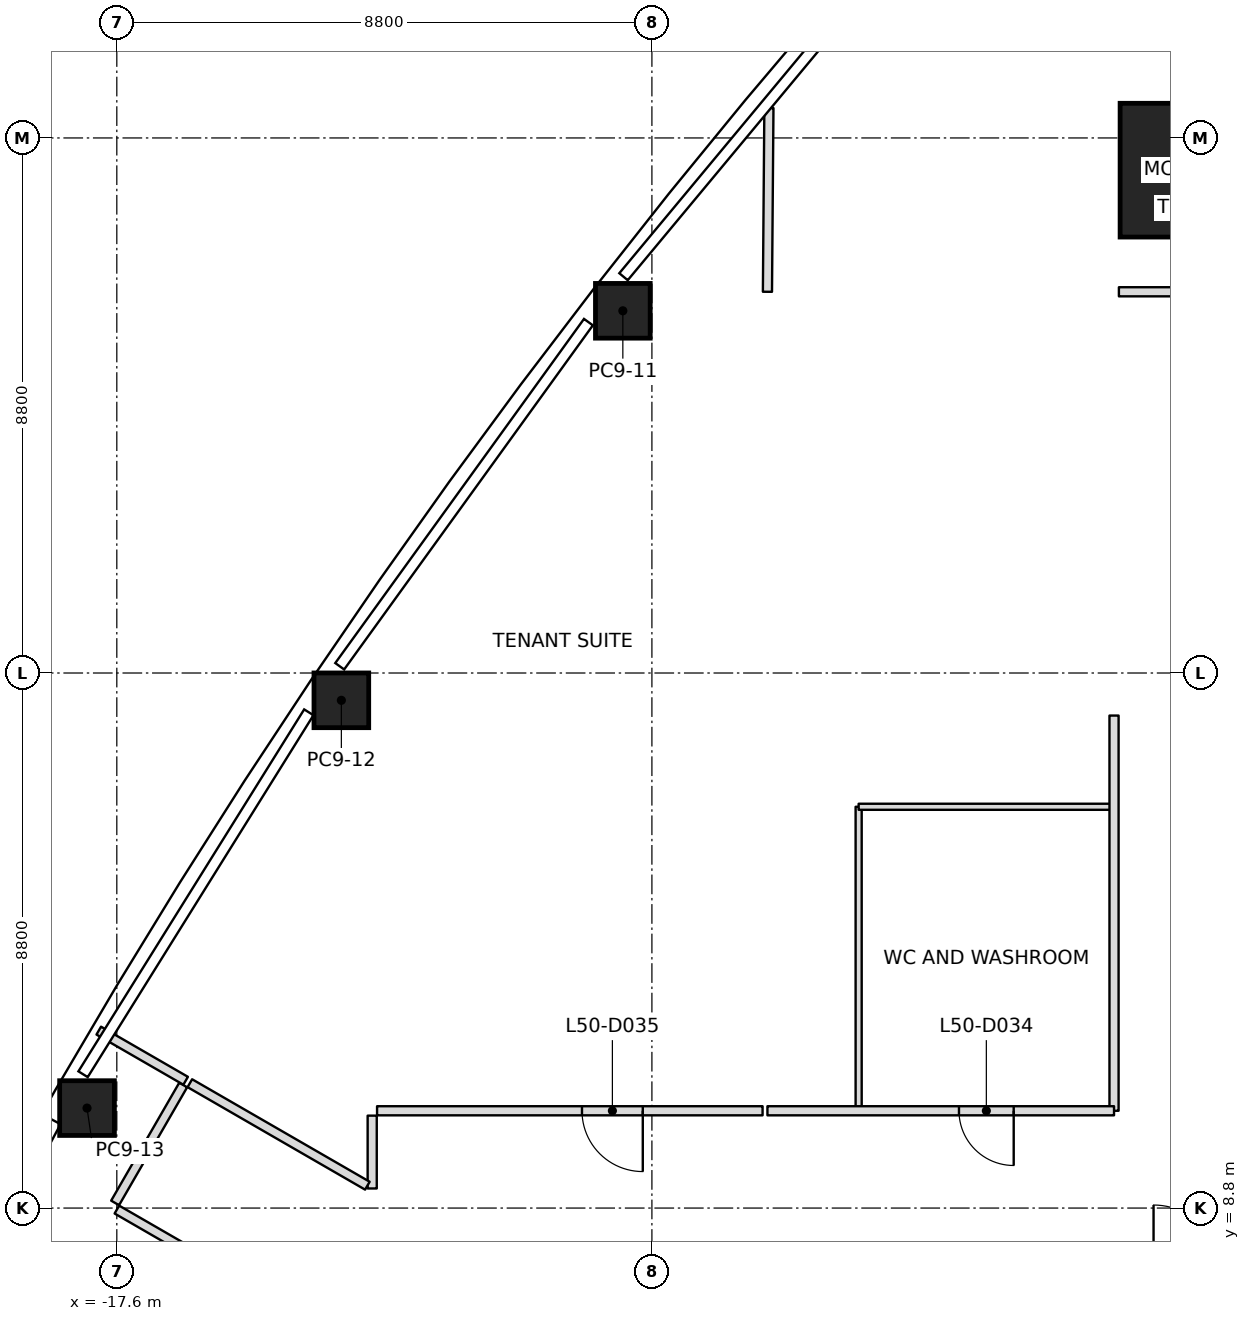
"""IFC4 building model, lengths in metres.
Left out: names, types, materials, properties, quantities, classifications, styles, units other than length and angle.
Written with IfcOpenShell. Run it as: python <this file> out.ifc"""

import sys

from ifc_helpers import new_model, si_unit, direction, frame, frame_2d, origin, origin_2d, place, context, subcontext, project, spatial, rectangle, extrude, clip, halfspace, element, fill, save


model = new_model("IFC4")
c1 = context("Model", 3, precision=1e-05, world=origin(), true_north=direction((0.0, 1.0)))
c2 = subcontext(c1, "Body", "Model", "MODEL_VIEW")
j1 = project(units=[si_unit("LENGTHUNIT", "METRE"), si_unit("PLANEANGLEUNIT", "RADIAN")], contexts=[c1])
p1 = place(None, origin())
s1 = spatial("IfcSite", under=j1, at=p1, CompositionType="ELEMENT")
p2 = place(p1, origin())
s2 = spatial("IfcBuilding", under=s1, at=p2, CompositionType="ELEMENT")
p3 = place(p2, frame((0.0, 0.0, 227.0)))
s3 = spatial("IfcBuildingStorey", under=s2, at=p3, CompositionType="ELEMENT", Elevation=227.0)
p4 = place(p3, frame((0.0, 25.87, 0.0), z_axis=(0.0, -0.032209841054, 0.999481128456), x_axis=(1.0, 0.0, 0.0)))
e1 = element("IfcColumn", 1, at=p4, inside=s3, PredefinedType="COLUMN", context=c2, shape_type="SweptSolid", body=[
    clip(extrude(rectangle(XDim=2.2, YDim=2.2, at=origin_2d()), origin(), (0.0, 0.0, 1.0), 4.002), halfspace(frame((0.0, 0.0, 0.008)), True)),
])
p5 = place(p3, frame((-9.278, 23.557, 0.0), z_axis=(0.000244089904, -0.020381506962, 0.999792245716), x_axis=(0.612951165018, 0.789959701895, 0.015954268541)))
e2 = element("IfcColumn", 2, at=p5, inside=s3, PredefinedType="COLUMN", context=c2, shape_type="SweptSolid", body=[
    clip(extrude(rectangle(XDim=0.9, YDim=0.9, at=origin_2d()), origin(), (0.0, 0.0, 1.0), 4.001), halfspace(frame((0.0, 0.0, 0.003)), True)),
])
p6 = place(p3, frame((-13.907, 17.151, 0.0), z_axis=(0.005248490815, -0.013243284963, 0.999898529226), x_axis=(0.557760604699, 0.829962689553, 0.008064849343)))
e3 = element("IfcColumn", 3, at=p6, inside=s3, PredefinedType="COLUMN", context=c2, shape_type="SweptSolid", body=[
    clip(extrude(rectangle(XDim=0.9, YDim=0.9, at=origin_2d()), origin(), (0.0, 0.0, 1.0), 4.0), halfspace(frame((0.0, 0.0, 0.002)), True)),
])
p7 = place(p3, frame((-18.09, 10.444, 0.0), z_axis=(0.009948074445, -0.005736926367, 0.999934059571), x_axis=(0.499975258342, 0.8660396879, -5.385525e-06)))
e4 = element("IfcColumn", 4, at=p7, inside=s3, PredefinedType="COLUMN", context=c2, shape_type="SweptSolid", body=[
    clip(extrude(rectangle(XDim=0.9, YDim=0.9, at=origin_2d()), origin(), (0.0, 0.0, 1.0), 4.0), halfspace(frame((0.0, 0.0, 0.001)), True)),
])
p8 = place(p3, frame((-16.468, 10.894, 0.0), z_axis=(0.0, 0.0, 1.0), x_axis=(-0.866040211805, 0.499974350878, 0.0)))
e5 = element("IfcWall", 5, at=p8, inside=s3, PredefinedType="PARTITIONING", context=c2, shape_type="SweptSolid", body=[
    extrude(rectangle(XDim=1.65, YDim=0.15, at=frame_2d((0.825, 0.0))), origin(), (0.0, 0.0, 1.0), 3.234),
])
p9 = place(p3, frame((-6.9, 23.87, 0.0), z_axis=(0.0, 0.0, 1.0), x_axis=(0.007997805274, 0.999968017044, 0.0)))
e6 = element("IfcWall", 6, at=p9, inside=s3, PredefinedType="PARTITIONING", context=c2, shape_type="SweptSolid", body=[
    extrude(rectangle(XDim=3.022, YDim=0.15, at=frame_2d((1.511, 0.0))), origin(), (0.0, 0.0, 1.0), 3.234),
])
p10 = place(p3, frame((-17.599, 8.775, 0.0), z_axis=(0.0, 0.0, 1.0), x_axis=(0.866022073929, -0.500005767435, 0.0)))
e7 = element("IfcWall", 7, at=p10, inside=s3, PredefinedType="PARTITIONING", context=c2, shape_type="SweptSolid", body=[
    extrude(rectangle(XDim=4.849, YDim=0.15, at=frame_2d((2.424, 0.0))), origin(), (0.0, 0.0, 1.0), 3.45),
])
p11 = place(p3, frame((-16.508, 10.824, 0.0), z_axis=(0.0, 0.0, 1.0), x_axis=(-0.500030632641, -0.866007717299, 0.0)))
e8 = element("IfcWall", 8, at=p11, inside=s3, PredefinedType="PARTITIONING", context=c2, shape_type="SweptSolid", body=[
    extrude(rectangle(XDim=2.24, YDim=0.15, at=frame_2d((1.12, 0.0))), origin(), (0.0, 0.0, 1.0), 3.45),
])
p12 = place(p3, frame((-13.4, 10.32, 0.0), z_axis=(0.0, 0.0, 1.0), x_axis=(0.0, -1.0, 0.0)))
e9 = element("IfcWall", 9, at=p12, inside=s3, PredefinedType="PARTITIONING", context=c2, shape_type="SweptSolid", body=[
    extrude(rectangle(XDim=1.198, YDim=0.15, at=frame_2d((0.599, 0.0))), origin(), (0.0, 0.0, 1.0), 3.45),
])
p13 = place(p3, frame((-13.479, 9.168, 0.0), z_axis=(0.0, 0.0, 1.0), x_axis=(-0.866023977509, 0.500002470373, 0.0)))
e10 = element("IfcWall", 10, at=p13, inside=s3, PredefinedType="PARTITIONING", context=c2, shape_type="SweptSolid", body=[
    extrude(rectangle(XDim=3.371, YDim=0.15, at=frame_2d((1.686, 0.0))), origin(), (0.0, 0.0, 1.0), 3.45),
])
p14 = place(p3, frame((-6.98, 10.4, 0.0), z_axis=(0.0, 0.0, 1.0), x_axis=(-1.0, 0.0, 0.0)))
e11 = element("IfcWall", 11, at=p14, inside=s3, PredefinedType="PARTITIONING", context=c2, shape_type="SweptSolid", body=[
    extrude(rectangle(XDim=6.34, YDim=0.15, at=frame_2d((3.17, 0.0))), origin(), (0.0, 0.0, 1.0), 3.317),
])
p15 = place(p14, frame((1.97, 0.0, 0.0)))
e12 = element("IfcOpeningElement", 12, at=p15, cuts=e11, PredefinedType="OPENING", context=c2, shape_type="SweptSolid", body=[
    extrude(rectangle(XDim=1.0, YDim=2.1, at=frame_2d((0.5, 1.05))), frame((0.0, 0.075, 0.0), z_axis=(0.0, -1.0, 0.0), x_axis=(1.0, 0.0, 0.0)), (0.0, 0.0, 1.0), 0.15),
])
p16 = place(p3, frame((-1.2, 16.9, 0.0), z_axis=(0.0, 0.0, 1.0), x_axis=(0.0, -1.0, 0.0)))
e13 = element("IfcWall", 13, at=p16, inside=s3, PredefinedType="PARTITIONING", context=c2, shape_type="SweptSolid", body=[
    extrude(rectangle(XDim=6.5, YDim=0.15, at=frame_2d((3.25, 0.0))), origin(), (0.0, 0.0, 1.0), 3.317),
])
p17 = place(p3, frame((-1.2, 10.4, 0.0), z_axis=(0.0, 0.0, 1.0), x_axis=(-1.0, 0.0, 0.0)))
e14 = element("IfcWall", 14, at=p17, inside=s3, PredefinedType="PARTITIONING", context=c2, shape_type="SweptSolid", body=[
    extrude(rectangle(XDim=5.7, YDim=0.15, at=frame_2d((2.85, 0.0))), origin(), (0.0, 0.0, 1.0), 3.45),
])
p18 = place(p17, frame((1.65, 0.0, 0.0)))
e15 = element("IfcOpeningElement", 15, at=p18, cuts=e14, PredefinedType="OPENING", context=c2, shape_type="SweptSolid", body=[
    extrude(rectangle(XDim=0.9, YDim=2.1, at=frame_2d((0.45, 1.05))), frame((0.0, 0.075, 0.0), z_axis=(0.0, -1.0, 0.0), x_axis=(1.0, 0.0, 0.0)), (0.0, 0.0, 1.0), 0.15),
])
p19 = place(p3, frame((1.12, 23.87, 0.0), z_axis=(0.0, 0.0, 1.0), x_axis=(-1.0, 0.0, 0.0)))
e16 = element("IfcWall", 16, at=p19, inside=s3, PredefinedType="PARTITIONING", context=c2, shape_type="SweptSolid", body=[
    extrude(rectangle(XDim=2.24, YDim=0.15, at=frame_2d((1.12, 0.0))), origin(), (0.0, 0.0, 1.0), 3.233),
])
p20 = place(p3, frame((-5.4, 10.43, 0.0), z_axis=(0.0, 0.0, 1.0), x_axis=(0.0, 1.0, 0.0)))
e17 = element("IfcWall", 17, at=p20, inside=s3, PredefinedType="PARTITIONING", context=c2, shape_type="SweptSolid", body=[
    extrude(rectangle(XDim=4.97, YDim=0.1, at=frame_2d((2.485, 0.0))), origin(), (0.0, 0.0, 1.0), 3.45),
])
p21 = place(p3, frame((-5.4, 15.4, 0.0), z_axis=(0.0, 0.0, 1.0), x_axis=(1.0, 0.0, 0.0)))
e18 = element("IfcWall", 18, at=p21, inside=s3, PredefinedType="PARTITIONING", context=c2, shape_type="SweptSolid", body=[
    extrude(rectangle(XDim=4.17, YDim=0.1, at=frame_2d((2.085, 0.0))), origin(), (0.0, 0.0, 1.0), 3.317),
])
p22 = place(p18, origin())
e19 = element("IfcDoor", 19, at=p22, inside=s3, OperationType="SINGLE_SWING_LEFT", PredefinedType="DOOR", context=c2, shape_type="SweptSolid", body=[
    extrude(rectangle(XDim=0.9, YDim=2.1, at=frame_2d((0.45, 1.05))), frame((0.0, 0.025, 0.0), z_axis=(0.0, -1.0, 0.0), x_axis=(1.0, 0.0, 0.0)), (0.0, 0.0, 1.0), 0.05),
])
fill(e15, e19)
p23 = place(p15, origin())
e20 = element("IfcDoor", 20, at=p23, inside=s3, OperationType="SINGLE_SWING_RIGHT", PredefinedType="DOOR", context=c2, shape_type="SweptSolid", body=[
    extrude(rectangle(XDim=1.0, YDim=2.1, at=frame_2d((0.5, 1.05))), frame((0.0, 0.025, 0.0), z_axis=(0.0, -1.0, 0.0), x_axis=(1.0, 0.0, 0.0)), (0.0, 0.0, 1.0), 0.05),
])
fill(e12, e20)
save(model, sys.argv[1])
